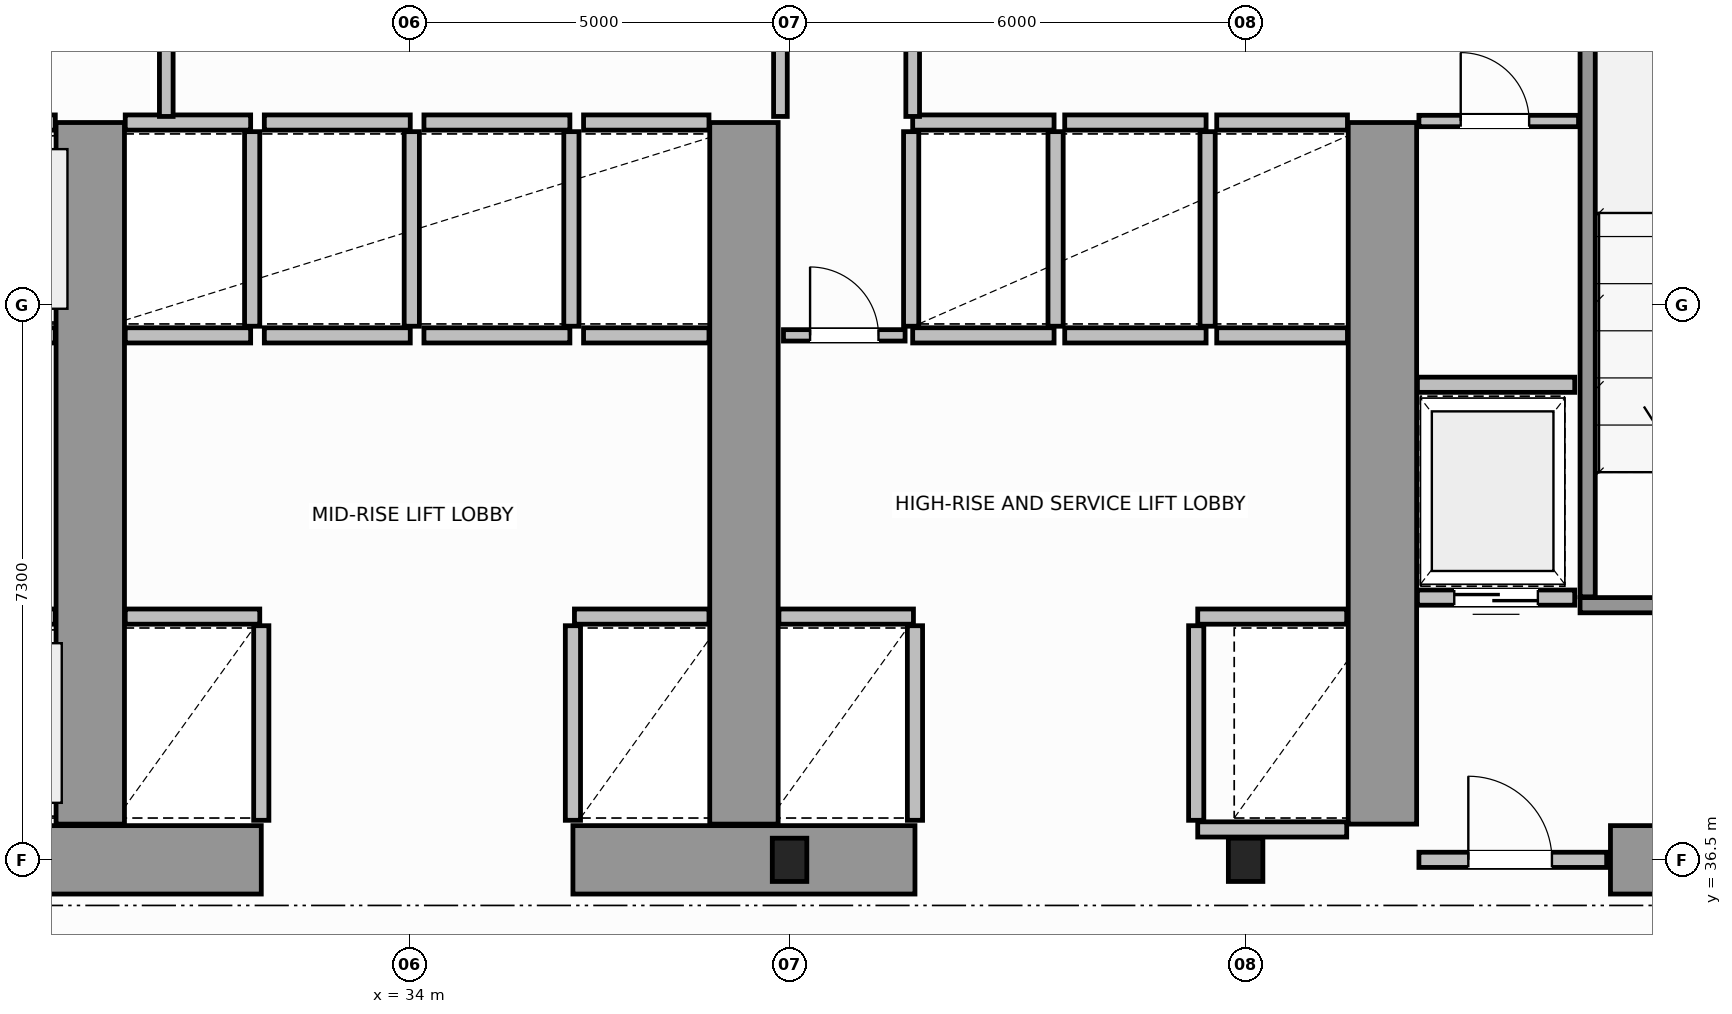
"""IFC4 building model, lengths in metres.
Left out: names, types, materials, properties, quantities, classifications, styles, units other than length and angle.
Written with IfcOpenShell. Run it as: python <this file> out.ifc"""

import sys

from ifc_helpers import new_model, si_unit, direction, frame, frame_2d, origin, origin_2d, place, context, subcontext, project, spatial, rectangle, i_section, extrude, source, transform, mapped, element, fill, save


model = new_model("IFC4")
c1 = context("Model", 3, precision=1e-05, world=origin(), true_north=direction((0.0, 1.0)))
c2 = subcontext(c1, "Body", "Model", "MODEL_VIEW")
j1 = project(units=[si_unit("LENGTHUNIT", "METRE"), si_unit("PLANEANGLEUNIT", "RADIAN")], contexts=[c1])
p1 = place(None, origin())
s1 = spatial("IfcSite", under=j1, at=p1, CompositionType="ELEMENT")
p2 = place(p1, origin())
s2 = spatial("IfcBuilding", under=s1, at=p2, CompositionType="ELEMENT")
p3 = place(p2, frame((0.0, 0.0, 45.4)))
s3 = spatial("IfcBuildingStorey", under=s2, at=p3, CompositionType="ELEMENT", Elevation=45.4)
m1 = source(origin(), c2, "Body", "SweptSolid", [
    extrude(i_section(OverallWidth=0.454, OverallDepth=0.569, WebThickness=0.078, FlangeThickness=0.08, FilletRadius=0.015, at=origin_2d()), origin(), (0.0, 0.0, 1.0), 3.8),
])
for number, where, z_axis, x_axis in (
    (1, (39.0, 36.5, 0.0), (0.0, 0.0, 1.0), (1.0, 0.0, 0.0)),
    (2, (45.0, 36.5, 0.0), (0.0, 0.0, 1.0), (1.0, 0.0, 0.0)),
):
    element("IfcColumn", number, at=place(p3, frame(where, z_axis=z_axis, x_axis=x_axis)), inside=s3, PredefinedType="COLUMN", context=c2, shape_type="MappedRepresentation", body=[
        mapped(m1, transform((0.0, 0.0, 0.0), scale=1.0)),
    ])
for number, where, z_axis, x_axis in (
    (3, (27.55, 36.5, 0.0), (0.0, 0.0, 1.0), (1.0, 0.0, 0.0)),
    (4, (36.15, 36.5, 0.0), (0.0, 0.0, 1.0), (1.0, 0.0, 0.0)),
):
    element("IfcWall", number, at=place(p3, frame(where, z_axis=z_axis, x_axis=x_axis)), inside=s3, PredefinedType="SHEAR", context=c2, shape_type="SweptSolid", body=[
        extrude(rectangle(XDim=4.5, YDim=0.9, at=frame_2d((2.25, 0.0))), origin(), (0.0, 0.0, 1.0), 3.8),
    ])
p4 = place(p3, frame((49.8, 36.5, 0.0), z_axis=(0.0, 0.0, 1.0), x_axis=(1.0, 0.0, 0.0)))
e5 = element("IfcWall", 5, at=p4, inside=s3, PredefinedType="SHEAR", context=c2, shape_type="SweptSolid", body=[
    extrude(rectangle(XDim=3.73, YDim=0.9, at=frame_2d((1.865, 0.0))), origin(), (0.0, 0.0, 1.0), 2.38),
])
for number, where, z_axis, x_axis in (
    (6, (29.8, 36.97, 0.0), (0.0, 0.0, 1.0), (0.0, 1.0, 0.0)),
    (7, (38.4, 36.97, 0.0), (0.0, 0.0, 1.0), (0.0, 1.0, 0.0)),
    (8, (46.8, 36.97, 0.0), (0.0, 0.0, 1.0), (0.0, 1.0, 0.0)),
):
    element("IfcWall", number, at=place(p3, frame(where, z_axis=z_axis, x_axis=x_axis)), inside=s3, PredefinedType="SHEAR", context=c2, shape_type="SweptSolid", body=[
        extrude(rectangle(XDim=9.23, YDim=0.9, at=frame_2d((4.615, 0.0))), origin(), (0.0, 0.0, 1.0), 3.8),
    ])
p5 = place(p3, frame((49.4, 39.85, 0.0), z_axis=(0.0, 0.0, 1.0), x_axis=(1.0, 0.0, 0.0)))
e9 = element("IfcWall", 9, at=p5, inside=s3, PredefinedType="SOLIDWALL", context=c2, shape_type="SweptSolid", body=[
    extrude(rectangle(XDim=4.15, YDim=0.2, at=frame_2d((2.075, 0.0))), origin(), (0.0, 0.0, 1.0), 3.8),
])
p6 = place(p5, frame((1.325, 0.0, 0.0)))
e10 = element("IfcOpeningElement", 10, at=p6, cuts=e9, PredefinedType="OPENING", context=c2, shape_type="SweptSolid", body=[
    extrude(rectangle(XDim=1.1, YDim=2.15, at=frame_2d((0.55, 1.075))), frame((0.0, 0.11, 0.0), z_axis=(0.0, -1.0, 0.0), x_axis=(1.0, 0.0, 0.0)), (0.0, 0.0, 1.0), 0.22),
])
p7 = place(p3, frame((49.5, 39.96, 0.0), z_axis=(0.0, 0.0, 1.0), x_axis=(0.0, 1.0, 0.0)))
e11 = element("IfcWall", 11, at=p7, inside=s3, PredefinedType="SOLIDWALL", context=c2, shape_type="SweptSolid", body=[
    extrude(rectangle(XDim=9.93, YDim=0.2, at=frame_2d((4.965, 0.0))), origin(), (0.0, 0.0, 1.0), 3.8),
])
p8 = place(p3, frame((47.28, 36.5, 0.0), z_axis=(0.0, 0.0, 1.0), x_axis=(1.0, 0.0, 0.0)))
e12 = element("IfcWall", 12, at=p8, inside=s3, PredefinedType="SOLIDWALL", context=c2, shape_type="SweptSolid", body=[
    extrude(rectangle(XDim=2.47, YDim=0.2, at=frame_2d((1.235, 0.0))), origin(), (0.0, 0.0, 1.0), 2.37),
])
p9 = place(p8, frame((0.65, 0.0, 0.0)))
e13 = element("IfcOpeningElement", 13, at=p9, cuts=e12, PredefinedType="OPENING", context=c2, shape_type="SweptSolid", body=[
    extrude(rectangle(XDim=1.1, YDim=2.15, at=frame_2d((0.55, 1.075))), frame((0.0, 0.11, 0.0), z_axis=(0.0, -1.0, 0.0), x_axis=(1.0, 0.0, 0.0)), (0.0, 0.0, 1.0), 0.22),
])
p10 = place(p3, frame((27.57, 39.7, 0.0), z_axis=(0.0, 0.0, 1.0), x_axis=(1.0, 0.0, 0.0)))
e14 = element("IfcWall", 14, at=p10, inside=s3, PredefinedType="SOLIDWALL", context=c2, shape_type="SweptSolid", body=[
    extrude(rectangle(XDim=1.77, YDim=0.2, at=frame_2d((0.885, 0.0))), origin(), (0.0, 0.0, 1.0), 3.58),
])
p11 = place(p10, frame((0.335, 0.0, 0.0)))
e15 = element("IfcOpeningElement", 15, at=p11, cuts=e14, PredefinedType="OPENING", context=c2, shape_type="SweptSolid", body=[
    extrude(rectangle(XDim=1.1, YDim=2.15, at=frame_2d((0.55, 1.075))), frame((0.0, 0.11, 0.0), z_axis=(0.0, -1.0, 0.0), x_axis=(1.0, 0.0, 0.0)), (0.0, 0.0, 1.0), 0.22),
])
p12 = place(p3, frame((27.69, 43.4, 0.0), z_axis=(0.0, 0.0, 1.0), x_axis=(1.0, 0.0, 0.0)))
e16 = element("IfcWall", 16, at=p12, inside=s3, PredefinedType="SOLIDWALL", context=c2, shape_type="SweptSolid", body=[
    extrude(rectangle(XDim=1.65, YDim=0.2, at=frame_2d((0.825, 0.0))), origin(), (0.0, 0.0, 1.0), 3.58),
])
p13 = place(p12, frame((0.275, 0.0, 0.0)))
e17 = element("IfcOpeningElement", 17, at=p13, cuts=e16, PredefinedType="OPENING", context=c2, shape_type="SweptSolid", body=[
    extrude(rectangle(XDim=1.1, YDim=2.15, at=frame_2d((0.55, 1.075))), frame((0.0, 0.11, 0.0), z_axis=(0.0, -1.0, 0.0), x_axis=(1.0, 0.0, 0.0)), (0.0, 0.0, 1.0), 0.22),
])
p14 = place(p3, frame((27.69, 46.2, 0.0), z_axis=(0.0, 0.0, 1.0), x_axis=(1.0, 0.0, 0.0)))
e18 = element("IfcWall", 18, at=p14, inside=s3, PredefinedType="SOLIDWALL", context=c2, shape_type="SweptSolid", body=[
    extrude(rectangle(XDim=1.65, YDim=0.2, at=frame_2d((0.825, 0.0))), origin(), (0.0, 0.0, 1.0), 3.58),
])
p15 = place(p3, frame((30.26, 39.7, 0.0), z_axis=(0.0, 0.0, 1.0), x_axis=(1.0, 0.0, 0.0)))
e19 = element("IfcWall", 19, at=p15, inside=s3, PredefinedType="SOLIDWALL", context=c2, shape_type="SweptSolid", body=[
    extrude(rectangle(XDim=1.77, YDim=0.2, at=frame_2d((0.885, 0.0))), origin(), (0.0, 0.0, 1.0), 3.58),
])
p16 = place(p3, frame((32.05, 37.02, 0.0), z_axis=(0.0, 0.0, 1.0), x_axis=(0.0, 1.0, 0.0)))
e20 = element("IfcWall", 20, at=p16, inside=s3, PredefinedType="SOLIDWALL", context=c2, shape_type="SweptSolid", body=[
    extrude(rectangle(XDim=2.56, YDim=0.2, at=frame_2d((1.28, 0.0))), origin(), (0.0, 0.0, 1.0), 3.58),
])
p17 = place(p3, frame((36.17, 39.7, 0.0), z_axis=(0.0, 0.0, 1.0), x_axis=(1.0, 0.0, 0.0)))
e21 = element("IfcWall", 21, at=p17, inside=s3, PredefinedType="SOLIDWALL", context=c2, shape_type="SweptSolid", body=[
    extrude(rectangle(XDim=1.77, YDim=0.2, at=frame_2d((0.885, 0.0))), origin(), (0.0, 0.0, 1.0), 3.58),
])
p18 = place(p3, frame((36.15, 37.02, 0.0), z_axis=(0.0, 0.0, 1.0), x_axis=(0.0, 1.0, 0.0)))
e22 = element("IfcWall", 22, at=p18, inside=s3, PredefinedType="SOLIDWALL", context=c2, shape_type="SweptSolid", body=[
    extrude(rectangle(XDim=2.56, YDim=0.2, at=frame_2d((1.28, 0.0))), origin(), (0.0, 0.0, 1.0), 3.58),
])
for number, where, z_axis, x_axis in (
    (23, (30.26, 43.4, 0.0), (0.0, 0.0, 1.0), (1.0, 0.0, 0.0)),
    (24, (30.26, 46.2, 0.0), (0.0, 0.0, 1.0), (1.0, 0.0, 0.0)),
):
    element("IfcWall", number, at=place(p3, frame(where, z_axis=z_axis, x_axis=x_axis)), inside=s3, PredefinedType="SOLIDWALL", context=c2, shape_type="SweptSolid", body=[
        extrude(rectangle(XDim=1.65, YDim=0.2, at=frame_2d((0.825, 0.0))), origin(), (0.0, 0.0, 1.0), 3.58),
    ])
p19 = place(p3, frame((31.93, 43.52, 0.0), z_axis=(0.0, 0.0, 1.0), x_axis=(0.0, 1.0, 0.0)))
e25 = element("IfcWall", 25, at=p19, inside=s3, PredefinedType="SOLIDWALL", context=c2, shape_type="SweptSolid", body=[
    extrude(rectangle(XDim=2.56, YDim=0.2, at=frame_2d((1.28, 0.0))), origin(), (0.0, 0.0, 1.0), 3.58),
])
for number, where, z_axis, x_axis in (
    (26, (32.09, 43.4, 0.0), (0.0, 0.0, 1.0), (1.0, 0.0, 0.0)),
    (27, (32.09, 46.2, 0.0), (0.0, 0.0, 1.0), (1.0, 0.0, 0.0)),
):
    element("IfcWall", number, at=place(p3, frame(where, z_axis=z_axis, x_axis=x_axis)), inside=s3, PredefinedType="SOLIDWALL", context=c2, shape_type="SweptSolid", body=[
        extrude(rectangle(XDim=1.92, YDim=0.2, at=frame_2d((0.96, 0.0))), origin(), (0.0, 0.0, 1.0), 3.58),
    ])
p20 = place(p3, frame((34.03, 43.52, 0.0), z_axis=(0.0, 0.0, 1.0), x_axis=(0.0, 1.0, 0.0)))
e28 = element("IfcWall", 28, at=p20, inside=s3, PredefinedType="SOLIDWALL", context=c2, shape_type="SweptSolid", body=[
    extrude(rectangle(XDim=2.56, YDim=0.2, at=frame_2d((1.28, 0.0))), origin(), (0.0, 0.0, 1.0), 3.58),
])
for number, where, z_axis, x_axis in (
    (29, (34.19, 43.4, 0.0), (0.0, 0.0, 1.0), (1.0, 0.0, 0.0)),
    (30, (34.19, 46.2, 0.0), (0.0, 0.0, 1.0), (1.0, 0.0, 0.0)),
):
    element("IfcWall", number, at=place(p3, frame(where, z_axis=z_axis, x_axis=x_axis)), inside=s3, PredefinedType="SOLIDWALL", context=c2, shape_type="SweptSolid", body=[
        extrude(rectangle(XDim=1.92, YDim=0.2, at=frame_2d((0.96, 0.0))), origin(), (0.0, 0.0, 1.0), 3.58),
    ])
p21 = place(p3, frame((36.13, 43.52, 0.0), z_axis=(0.0, 0.0, 1.0), x_axis=(0.0, 1.0, 0.0)))
e31 = element("IfcWall", 31, at=p21, inside=s3, PredefinedType="SOLIDWALL", context=c2, shape_type="SweptSolid", body=[
    extrude(rectangle(XDim=2.56, YDim=0.2, at=frame_2d((1.28, 0.0))), origin(), (0.0, 0.0, 1.0), 3.58),
])
for number, where, z_axis, x_axis in (
    (32, (36.29, 43.4, 0.0), (0.0, 0.0, 1.0), (1.0, 0.0, 0.0)),
    (33, (36.29, 46.2, 0.0), (0.0, 0.0, 1.0), (1.0, 0.0, 0.0)),
):
    element("IfcWall", number, at=place(p3, frame(where, z_axis=z_axis, x_axis=x_axis)), inside=s3, PredefinedType="SOLIDWALL", context=c2, shape_type="SweptSolid", body=[
        extrude(rectangle(XDim=1.65, YDim=0.2, at=frame_2d((0.825, 0.0))), origin(), (0.0, 0.0, 1.0), 3.58),
    ])
p22 = place(p3, frame((38.86, 39.7, 0.0), z_axis=(0.0, 0.0, 1.0), x_axis=(1.0, 0.0, 0.0)))
e34 = element("IfcWall", 34, at=p22, inside=s3, PredefinedType="SOLIDWALL", context=c2, shape_type="SweptSolid", body=[
    extrude(rectangle(XDim=1.77, YDim=0.2, at=frame_2d((0.885, 0.0))), origin(), (0.0, 0.0, 1.0), 3.58),
])
p23 = place(p3, frame((40.65, 37.02, 0.0), z_axis=(0.0, 0.0, 1.0), x_axis=(0.0, 1.0, 0.0)))
e35 = element("IfcWall", 35, at=p23, inside=s3, PredefinedType="SOLIDWALL", context=c2, shape_type="SweptSolid", body=[
    extrude(rectangle(XDim=2.56, YDim=0.2, at=frame_2d((1.28, 0.0))), origin(), (0.0, 0.0, 1.0), 3.58),
])
p24 = place(p3, frame((44.37, 39.7, 0.0), z_axis=(0.0, 0.0, 1.0), x_axis=(1.0, 0.0, 0.0)))
e36 = element("IfcWall", 36, at=p24, inside=s3, PredefinedType="SOLIDWALL", context=c2, shape_type="SweptSolid", body=[
    extrude(rectangle(XDim=1.96, YDim=0.2, at=frame_2d((0.98, 0.0))), origin(), (0.0, 0.0, 1.0), 3.58),
])
p25 = place(p3, frame((44.37, 36.9, 0.0), z_axis=(0.0, 0.0, 1.0), x_axis=(1.0, 0.0, 0.0)))
e37 = element("IfcWall", 37, at=p25, inside=s3, PredefinedType="SOLIDWALL", context=c2, shape_type="SweptSolid", body=[
    extrude(rectangle(XDim=1.96, YDim=0.2, at=frame_2d((0.98, 0.0))), origin(), (0.0, 0.0, 1.0), 2.37),
])
p26 = place(p3, frame((44.35, 37.02, 0.0), z_axis=(0.0, 0.0, 1.0), x_axis=(0.0, 1.0, 0.0)))
e38 = element("IfcWall", 38, at=p26, inside=s3, PredefinedType="SOLIDWALL", context=c2, shape_type="SweptSolid", body=[
    extrude(rectangle(XDim=2.56, YDim=0.2, at=frame_2d((1.28, 0.0))), origin(), (0.0, 0.0, 1.0), 3.58),
])
for number, where, z_axis, x_axis in (
    (39, (40.62, 43.4, 0.0), (0.0, 0.0, 1.0), (1.0, 0.0, 0.0)),
    (40, (40.62, 46.2, 0.0), (0.0, 0.0, 1.0), (1.0, 0.0, 0.0)),
):
    element("IfcWall", number, at=place(p3, frame(where, z_axis=z_axis, x_axis=x_axis)), inside=s3, PredefinedType="SOLIDWALL", context=c2, shape_type="SweptSolid", body=[
        extrude(rectangle(XDim=1.86, YDim=0.2, at=frame_2d((0.93, 0.0))), origin(), (0.0, 0.0, 1.0), 3.58),
    ])
for number, where, z_axis, x_axis in (
    (41, (40.6, 43.52, 0.0), (0.0, 0.0, 1.0), (0.0, 1.0, 0.0)),
    (42, (42.5, 43.52, 0.0), (0.0, 0.0, 1.0), (0.0, 1.0, 0.0)),
):
    element("IfcWall", number, at=place(p3, frame(where, z_axis=z_axis, x_axis=x_axis)), inside=s3, PredefinedType="SOLIDWALL", context=c2, shape_type="SweptSolid", body=[
        extrude(rectangle(XDim=2.56, YDim=0.2, at=frame_2d((1.28, 0.0))), origin(), (0.0, 0.0, 1.0), 3.58),
    ])
for number, where, z_axis, x_axis in (
    (43, (42.62, 43.4, 0.0), (0.0, 0.0, 1.0), (1.0, 0.0, 0.0)),
    (44, (42.62, 46.2, 0.0), (0.0, 0.0, 1.0), (1.0, 0.0, 0.0)),
):
    element("IfcWall", number, at=place(p3, frame(where, z_axis=z_axis, x_axis=x_axis)), inside=s3, PredefinedType="SOLIDWALL", context=c2, shape_type="SweptSolid", body=[
        extrude(rectangle(XDim=1.86, YDim=0.2, at=frame_2d((0.93, 0.0))), origin(), (0.0, 0.0, 1.0), 3.58),
    ])
p27 = place(p3, frame((44.5, 43.52, 0.0), z_axis=(0.0, 0.0, 1.0), x_axis=(0.0, 1.0, 0.0)))
e45 = element("IfcWall", 45, at=p27, inside=s3, PredefinedType="SOLIDWALL", context=c2, shape_type="SweptSolid", body=[
    extrude(rectangle(XDim=2.56, YDim=0.2, at=frame_2d((1.28, 0.0))), origin(), (0.0, 0.0, 1.0), 3.58),
])
for number, where, z_axis, x_axis in (
    (46, (44.62, 43.4, 0.0), (0.0, 0.0, 1.0), (1.0, 0.0, 0.0)),
    (47, (44.62, 46.2, 0.0), (0.0, 0.0, 1.0), (1.0, 0.0, 0.0)),
):
    element("IfcWall", number, at=place(p3, frame(where, z_axis=z_axis, x_axis=x_axis)), inside=s3, PredefinedType="SOLIDWALL", context=c2, shape_type="SweptSolid", body=[
        extrude(rectangle(XDim=1.72, YDim=0.2, at=frame_2d((0.86, 0.0))), origin(), (0.0, 0.0, 1.0), 3.58),
    ])
p28 = place(p3, frame((47.26, 39.95, 0.0), z_axis=(0.0, 0.0, 1.0), x_axis=(1.0, 0.0, 0.0)))
e48 = element("IfcWall", 48, at=p28, inside=s3, PredefinedType="SOLIDWALL", context=c2, shape_type="SweptSolid", body=[
    extrude(rectangle(XDim=2.07, YDim=0.2, at=frame_2d((1.035, 0.0))), origin(), (0.0, 0.0, 1.0), 3.58),
])
p29 = place(p28, frame((0.485, 0.0, 0.0)))
e49 = element("IfcOpeningElement", 49, at=p29, cuts=e48, PredefinedType="OPENING", context=c2, shape_type="SweptSolid", body=[
    extrude(rectangle(XDim=1.1, YDim=2.15, at=frame_2d((0.55, 1.075))), frame((0.0, 0.11, 0.0), z_axis=(0.0, -1.0, 0.0), x_axis=(1.0, 0.0, 0.0)), (0.0, 0.0, 1.0), 0.22),
])
p30 = place(p3, frame((47.26, 42.75, 0.0), z_axis=(0.0, 0.0, 1.0), x_axis=(1.0, 0.0, 0.0)))
e50 = element("IfcWall", 50, at=p30, inside=s3, PredefinedType="SOLIDWALL", context=c2, shape_type="SweptSolid", body=[
    extrude(rectangle(XDim=2.07, YDim=0.2, at=frame_2d((1.035, 0.0))), origin(), (0.0, 0.0, 1.0), 3.58),
])
p31 = place(p3, frame((47.28, 46.22, 0.0), z_axis=(0.0, 0.0, 1.0), x_axis=(1.0, 0.0, 0.0)))
e51 = element("IfcWall", 51, at=p31, inside=s3, PredefinedType="PARTITIONING", context=c2, shape_type="SweptSolid", body=[
    extrude(rectangle(XDim=2.1, YDim=0.15, at=frame_2d((1.05, 0.0))), origin(), (0.0, 0.0, 1.0), 3.58),
])
p32 = place(p31, frame((0.55, 0.0, 0.0)))
e52 = element("IfcOpeningElement", 52, at=p32, cuts=e51, PredefinedType="OPENING", context=c2, shape_type="SweptSolid", body=[
    extrude(rectangle(XDim=0.9, YDim=2.1, at=frame_2d((0.45, 1.05))), frame((0.0, 0.085, 0.0), z_axis=(0.0, -1.0, 0.0), x_axis=(1.0, 0.0, 0.0)), (0.0, 0.0, 1.0), 0.17),
])
p33 = place(p3, frame((38.92, 43.4, 0.0), z_axis=(0.0, 0.0, 1.0), x_axis=(1.0, 0.0, 0.0)))
e53 = element("IfcWall", 53, at=p33, inside=s3, PredefinedType="PARTITIONING", context=c2, shape_type="SweptSolid", body=[
    extrude(rectangle(XDim=1.6, YDim=0.15, at=frame_2d((0.8, 0.0))), origin(), (0.0, 0.0, 1.0), 3.58),
])
p34 = place(p33, frame((0.35, 0.0, 0.0)))
e54 = element("IfcOpeningElement", 54, at=p34, cuts=e53, PredefinedType="OPENING", context=c2, shape_type="SweptSolid", body=[
    extrude(rectangle(XDim=0.9, YDim=2.1, at=frame_2d((0.45, 1.05))), frame((0.0, 0.085, 0.0), z_axis=(0.0, -1.0, 0.0), x_axis=(1.0, 0.0, 0.0)), (0.0, 0.0, 1.0), 0.17),
])
for number, where, z_axis, x_axis in (
    (55, (30.8, 46.28, 0.0), (0.0, 0.0, 1.0), (0.0, 1.0, 0.0)),
    (56, (38.88, 46.28, 0.0), (0.0, 0.0, 1.0), (0.0, 1.0, 0.0)),
):
    element("IfcWall", number, at=place(p3, frame(where, z_axis=z_axis, x_axis=x_axis)), inside=s3, PredefinedType="PLUMBINGWALL", context=c2, shape_type="SweptSolid", body=[
        extrude(rectangle(XDim=1.94, YDim=0.18, at=frame_2d((0.97, 0.0))), origin(), (0.0, 0.0, 1.0), 3.58),
    ])
p35 = place(p3, frame((40.62, 46.28, 0.0), z_axis=(0.0, 0.0, 1.0), x_axis=(0.0, 1.0, 0.0)))
e57 = element("IfcWall", 57, at=p35, inside=s3, PredefinedType="PLUMBINGWALL", context=c2, shape_type="SweptSolid", body=[
    extrude(rectangle(XDim=2.0, YDim=0.18, at=frame_2d((1.0, 0.0))), origin(), (0.0, 0.0, 1.0), 3.58),
])
m2 = source(origin(), c2, "Body", "SweptSolid", [
    extrude(rectangle(XDim=1.1, YDim=2.15, at=frame_2d((0.55, 1.075))), frame((0.0, 0.025, 0.0), z_axis=(0.0, -1.0, 0.0), x_axis=(1.0, 0.0, 0.0)), (0.0, 0.0, 1.0), 0.05),
])
p36 = place(p9, origin())
e58 = element("IfcDoor", 58, at=p36, inside=s3, OperationType="SINGLE_SWING_LEFT", PredefinedType="DOOR", context=c2, shape_type="MappedRepresentation", body=[
    mapped(m2, transform((0.0, 0.0, 0.0), scale=1.0)),
])
fill(e13, e58)
p37 = place(p29, origin())
e59 = element("IfcDoor", 59, at=p37, inside=s3, OperationType="DOUBLE_DOOR_SLIDING", PredefinedType="DOOR", context=c2, shape_type="MappedRepresentation", body=[
    mapped(m2, transform((0.0, 0.0, 0.0), scale=1.0)),
])
fill(e49, e59)
m3 = source(origin(), c2, "Body", "SweptSolid", [
    extrude(rectangle(XDim=0.9, YDim=2.1, at=frame_2d((0.45, 1.05))), frame((0.0, 0.025, 0.0), z_axis=(0.0, -1.0, 0.0), x_axis=(1.0, 0.0, 0.0)), (0.0, 0.0, 1.0), 0.05),
])
p38 = place(p32, origin())
e60 = element("IfcDoor", 60, at=p38, inside=s3, OperationType="SINGLE_SWING_RIGHT", PredefinedType="DOOR", context=c2, shape_type="MappedRepresentation", body=[
    mapped(m3, transform((0.0, 0.0, 0.0), scale=1.0)),
])
fill(e52, e60)
p39 = place(p34, origin())
e61 = element("IfcDoor", 61, at=p39, inside=s3, OperationType="SINGLE_SWING_LEFT", PredefinedType="DOOR", context=c2, shape_type="MappedRepresentation", body=[
    mapped(m3, transform((0.0, 0.0, 0.0), scale=1.0)),
])
fill(e54, e61)
save(model, sys.argv[1])
